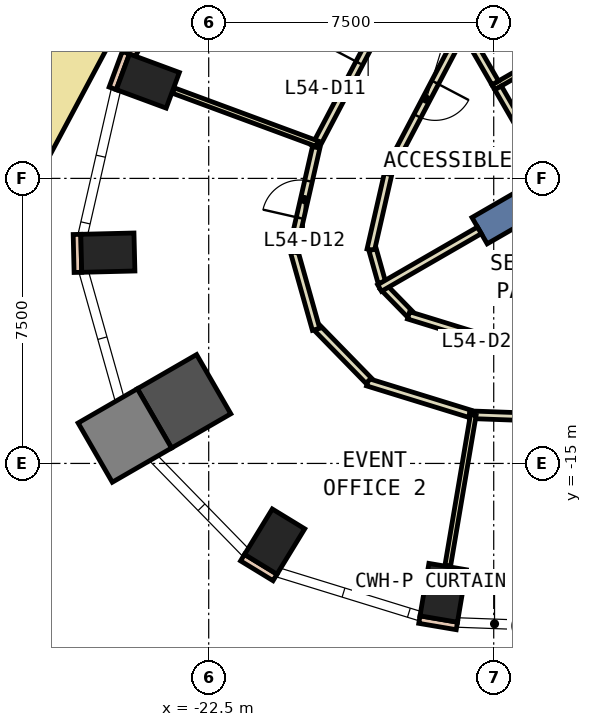
"""IFC4 building model, lengths in metres.
Left out: names, types, materials, properties, quantities, classifications, styles, units other than length and angle.
Written with IfcOpenShell. Run it as: python <this file> out.ifc"""

import sys

from ifc_helpers import new_model, si_unit, direction, frame, frame_2d, origin, origin_2d, place, context, subcontext, project, spatial, rectangle, extrude, element, fill, save


model = new_model("IFC4")
c1 = context("Model", 3, precision=1e-05, world=origin(), true_north=direction((0.0, 1.0)))
c2 = subcontext(c1, "Body", "Model", "MODEL_VIEW")
j1 = project(units=[si_unit("LENGTHUNIT", "METRE"), si_unit("PLANEANGLEUNIT", "RADIAN")], contexts=[c1])
p1 = place(None, origin())
s1 = spatial("IfcSite", under=j1, at=p1, CompositionType="ELEMENT")
p2 = place(p1, origin())
s2 = spatial("IfcBuilding", under=s1, at=p2, CompositionType="ELEMENT")
p3 = place(p2, frame((0.0, 0.0, 241.4)))
s3 = spatial("IfcBuildingStorey", under=s2, at=p3, CompositionType="ELEMENT", Elevation=241.4)
for number, where, z_axis, x_axis in (
    (1, (-16.33, -18.404, 0.0), (0.0, 0.0, 1.0), (-0.986, 0.167, 0.0)),
    (2, (-24.102, -4.939, 0.0), (0.0, 0.0, 1.0), (0.347, 0.938, 0.0)),
    (3, (-25.154, -9.454, 0.0), (0.0, 0.0, 1.0), (-0.025, 1.0, 0.0)),
):
    element("IfcColumn", number, at=place(p3, frame(where, z_axis=z_axis, x_axis=x_axis)), inside=s3, PredefinedType="COLUMN", context=c2, shape_type="SweptSolid", body=[
        extrude(rectangle(XDim=1.0, YDim=1.4, at=origin_2d()), origin(), (0.0, 0.0, 1.0), 3.26),
    ])
p4 = place(p3, frame((-23.148, -13.365, 0.0), z_axis=(0.0, 0.0, 1.0), x_axis=(0.866025403784, 0.5, 0.0)))
e4 = element("IfcColumn", 4, at=p4, inside=s3, PredefinedType="COLUMN", context=c2, shape_type="SweptSolid", body=[
    extrude(rectangle(XDim=1.8, YDim=1.8, at=origin_2d()), origin(), (0.0, 0.0, 1.0), 3.26),
])
p5 = place(p3, frame((-20.765, -17.057, 0.0), z_axis=(0.0, 0.0, 1.0), x_axis=(-0.853341581839, 0.521352227103, 0.0)))
e5 = element("IfcColumn", 5, at=p5, inside=s3, PredefinedType="COLUMN", context=c2, shape_type="SweptSolid", body=[
    extrude(rectangle(XDim=1.0, YDim=1.4, at=origin_2d()), origin(), (0.0, 0.0, 1.0), 3.26),
])
p6 = place(p3, frame((-24.707, -14.265, 0.0), z_axis=(0.0, 0.0, 1.0), x_axis=(0.866025403784, 0.5, 0.0)))
e6 = element("IfcColumn", 6, at=p6, inside=s3, PredefinedType="COLUMN", context=c2, shape_type="SweptSolid", body=[
    extrude(rectangle(XDim=1.8, YDim=1.8, at=origin_2d()), origin(), (0.0, 0.0, 1.0), 3.26),
])
p7 = place(p3, frame((-7.578, -4.375, -0.6), z_axis=(0.0, 0.0, 1.0), x_axis=(-0.866024315419, -0.5000018851, 0.0)))
e7 = element("IfcWall", 7, at=p7, inside=s3, PredefinedType="SHEAR", context=c2, shape_type="SweptSolid", body=[
    extrude(rectangle(XDim=9.0, YDim=0.8, at=frame_2d((4.5, 0.0))), origin(), (0.0, 0.0, 1.0), 3.86),
])
p8 = place(p3, frame((-24.679, -4.193, 0.0), z_axis=(0.0, 0.0, 1.0), x_axis=(-0.346892928577, -0.937904737222, 0.0)))
e8 = element("IfcWall", 8, at=p8, inside=s3, PredefinedType="STANDARD", context=c2, shape_type="SweptSolid", body=[
    extrude(rectangle(XDim=1.0, YDim=0.2, at=frame_2d((0.5, 0.0))), origin(), (0.0, 0.0, 1.0), 3.26),
])
p9 = place(p3, frame((-16.956, -19.109, 0.0), z_axis=(0.0, 0.0, 1.0), x_axis=(0.985961725342, -0.166971483074, 0.0)))
e9 = element("IfcWall", 9, at=p9, inside=s3, PredefinedType="STANDARD", context=c2, shape_type="SweptSolid", body=[
    extrude(rectangle(XDim=1.0, YDim=0.2, at=frame_2d((0.5, 0.0))), origin(), (0.0, 0.0, 1.0), 3.26),
])
p10 = place(p3, frame((-25.966, -8.974, 0.0), z_axis=(0.0, 0.0, 1.0), x_axis=(0.024192379573, -0.999707321555, 0.0)))
e10 = element("IfcWall", 10, at=p10, inside=s3, PredefinedType="STANDARD", context=c2, shape_type="SweptSolid", body=[
    extrude(rectangle(XDim=0.999, YDim=0.2, at=frame_2d((0.5, 0.0))), origin(), (0.0, 0.0, 1.0), 3.26),
])
p11 = place(p3, frame((-21.609, -17.479, 0.0), z_axis=(0.0, 0.0, 1.0), x_axis=(0.853679739553, -0.520798331677, 0.0)))
e11 = element("IfcWall", 11, at=p11, inside=s3, PredefinedType="STANDARD", context=c2, shape_type="SweptSolid", body=[
    extrude(rectangle(XDim=1.0, YDim=0.2, at=frame_2d((0.5, 0.0))), origin(), (0.0, 0.0, 1.0), 3.26),
])
p12 = place(p3, frame((-21.978, 0.698, 0.0), z_axis=(0.0, 0.0, 1.0), x_axis=(-0.465228032148, -0.885190871001, 0.0)))
e12 = element("IfcWall", 12, at=p12, inside=s3, PredefinedType="STANDARD", context=c2, shape_type="SweptSolid", body=[
    extrude(rectangle(XDim=5.572, YDim=0.3, at=frame_2d((2.786, 0.0))), origin(), (0.0, 0.0, 1.0), 3.26),
])
p13 = place(p12, frame((0.693, 0.0, 0.9)))
e13 = element("IfcOpeningElement", 13, at=p13, cuts=e12, PredefinedType="OPENING", context=c2, shape_type="SweptSolid", body=[
    extrude(rectangle(XDim=1.4, YDim=2.0, at=frame_2d((0.7, 1.0))), frame((0.0, 0.16, 0.0), z_axis=(0.0, -1.0, 0.0), x_axis=(1.0, 0.0, 0.0)), (0.0, 0.0, 1.0), 0.32),
])
p14 = place(p12, frame((3.479, 0.0, 0.9)))
e14 = element("IfcOpeningElement", 14, at=p14, cuts=e12, PredefinedType="OPENING", context=c2, shape_type="SweptSolid", body=[
    extrude(rectangle(XDim=1.4, YDim=2.0, at=frame_2d((0.7, 1.0))), frame((0.0, 0.16, 0.0), z_axis=(0.0, -1.0, 0.0), x_axis=(1.0, 0.0, 0.0)), (0.0, 0.0, 1.0), 0.32),
])
p15 = place(p3, frame((-24.806, -1.36, 0.0), z_axis=(0.0, 0.0, 1.0), x_axis=(-0.470628729942, -0.882331342837, 0.0)))
e15 = element("IfcWall", 15, at=p15, inside=s3, PredefinedType="STANDARD", context=c2, shape_type="SweptSolid", body=[
    extrude(rectangle(XDim=5.946, YDim=1.9, at=frame_2d((2.973, 0.0))), origin(), (0.0, 0.0, 1.0), 0.8),
])
p16 = place(p3, frame((-15.746, -3.458, 0.0), z_axis=(0.0, 0.0, 1.0), x_axis=(-0.465179971699, -0.885216128372, 0.0)))
e16 = element("IfcWall", 16, at=p16, inside=s3, PredefinedType="PARTITIONING", context=c2, shape_type="SweptSolid", body=[
    extrude(rectangle(XDim=4.424, YDim=0.2, at=frame_2d((2.212, 0.0))), origin(), (0.0, 0.0, 1.0), 3.26),
])
p17 = place(p16, frame((1.712, 0.0, 0.0)))
e17 = element("IfcOpeningElement", 17, at=p17, cuts=e16, PredefinedType="OPENING", context=c2, shape_type="SweptSolid", body=[
    extrude(rectangle(XDim=1.0, YDim=2.1, at=frame_2d((0.5, 1.05))), frame((0.0, 0.11, 0.0), z_axis=(0.0, -1.0, 0.0), x_axis=(1.0, 0.0, 0.0)), (0.0, 0.0, 1.0), 0.22),
])
p18 = place(p3, frame((-17.78, -7.383, 0.0), z_axis=(0.0, 0.0, 1.0), x_axis=(-0.222760041204, -0.974873306662, 0.0)))
e18 = element("IfcWall", 18, at=p18, inside=s3, PredefinedType="PARTITIONING", context=c2, shape_type="SweptSolid", body=[
    extrude(rectangle(XDim=2.047, YDim=0.2, at=frame_2d((1.024, 0.0))), origin(), (0.0, 0.0, 1.0), 3.26),
])
p19 = place(p3, frame((-18.187, -9.378, 0.0), z_axis=(0.0, 0.0, 1.0), x_axis=(0.270785141481, -0.962639811743, 0.0)))
e19 = element("IfcWall", 19, at=p19, inside=s3, PredefinedType="PARTITIONING", context=c2, shape_type="SweptSolid", body=[
    extrude(rectangle(XDim=0.894, YDim=0.2, at=frame_2d((0.447, 0.0))), origin(), (0.0, 0.0, 1.0), 3.26),
])
p20 = place(p3, frame((-17.915, -10.344, 0.0), z_axis=(0.0, 0.0, 1.0), x_axis=(0.698527813511, -0.715582904877, 0.0)))
e20 = element("IfcWall", 20, at=p20, inside=s3, PredefinedType="PARTITIONING", context=c2, shape_type="SweptSolid", body=[
    extrude(rectangle(XDim=1.002, YDim=0.2, at=frame_2d((0.501, 0.0))), origin(), (0.0, 0.0, 1.0), 3.26),
])
p21 = place(p3, frame((-17.241, -11.103, 0.0), z_axis=(0.0, 0.0, 1.0), x_axis=(0.95563113363, -0.294566013716, 0.0)))
e21 = element("IfcWall", 21, at=p21, inside=s3, PredefinedType="PARTITIONING", context=c2, shape_type="SweptSolid", body=[
    extrude(rectangle(XDim=2.036, YDim=0.2, at=frame_2d((1.018, 0.0))), origin(), (0.0, 0.0, 1.0), 3.26),
])
p22 = place(p3, frame((-15.3, -11.729, 0.0), z_axis=(0.0, 0.0, 1.0), x_axis=(0.999326350165, -0.036699398722, 0.0)))
e22 = element("IfcWall", 22, at=p22, inside=s3, PredefinedType="PARTITIONING", context=c2, shape_type="SweptSolid", body=[
    extrude(rectangle(XDim=4.251, YDim=0.2, at=frame_2d((2.125, 0.0))), origin(), (0.0, 0.0, 1.0), 3.26),
])
p23 = place(p22, frame((1.7, 0.0, 0.0)))
e23 = element("IfcOpeningElement", 23, at=p23, cuts=e22, PredefinedType="OPENING", context=c2, shape_type="SweptSolid", body=[
    extrude(rectangle(XDim=1.0, YDim=2.1, at=frame_2d((0.5, 1.05))), frame((0.0, 0.11, 0.0), z_axis=(0.0, -1.0, 0.0), x_axis=(1.0, 0.0, 0.0)), (0.0, 0.0, 1.0), 0.22),
])
p24 = place(p3, frame((-19.696, -6.675, 0.0), z_axis=(0.0, 0.0, 1.0), x_axis=(0.465165163774, 0.88522390976, 0.0)))
e24 = element("IfcWall", 24, at=p24, inside=s3, PredefinedType="PARTITIONING", context=c2, shape_type="SweptSolid", body=[
    extrude(rectangle(XDim=5.835, YDim=0.2, at=frame_2d((2.917, 0.0))), origin(), (0.0, 0.0, 1.0), 3.26),
])
p25 = place(p24, frame((2.492, 0.0, 0.0)))
e25 = element("IfcOpeningElement", 25, at=p25, cuts=e24, PredefinedType="OPENING", context=c2, shape_type="SweptSolid", body=[
    extrude(rectangle(XDim=1.0, YDim=2.1, at=frame_2d((0.5, 1.05))), frame((0.0, 0.11, 0.0), z_axis=(0.0, -1.0, 0.0), x_axis=(1.0, 0.0, 0.0)), (0.0, 0.0, 1.0), 0.22),
])
p26 = place(p3, frame((-15.632, -13.692, 0.0), z_axis=(0.0, 0.0, 1.0), x_axis=(-0.955600342663, 0.294665887239, 0.0)))
e26 = element("IfcWall", 26, at=p26, inside=s3, PredefinedType="PARTITIONING", context=c2, shape_type="SweptSolid", body=[
    extrude(rectangle(XDim=2.81, YDim=0.2, at=frame_2d((1.405, 0.0))), origin(), (0.0, 0.0, 1.0), 3.26),
])
p27 = place(p3, frame((-18.291, -12.822, 0.0), z_axis=(0.0, 0.0, 1.0), x_axis=(-0.698477855606, 0.715631668687, 0.0)))
e27 = element("IfcWall", 27, at=p27, inside=s3, PredefinedType="PARTITIONING", context=c2, shape_type="SweptSolid", body=[
    extrude(rectangle(XDim=1.921, YDim=0.2, at=frame_2d((0.961, 0.0))), origin(), (0.0, 0.0, 1.0), 3.26),
])
p28 = place(p3, frame((-19.675, -11.472, 0.0), z_axis=(0.0, 0.0, 1.0), x_axis=(-0.270905475888, 0.962605954238, 0.0)))
e28 = element("IfcWall", 28, at=p28, inside=s3, PredefinedType="PARTITIONING", context=c2, shape_type="SweptSolid", body=[
    extrude(rectangle(XDim=2.122, YDim=0.2, at=frame_2d((1.061, 0.0))), origin(), (0.0, 0.0, 1.0), 3.26),
])
p29 = place(p3, frame((-20.299, -9.43, 0.0), z_axis=(0.0, 0.0, 1.0), x_axis=(0.222523624687, 0.974927298036, 0.0)))
e29 = element("IfcWall", 29, at=p29, inside=s3, PredefinedType="PARTITIONING", context=c2, shape_type="SweptSolid", body=[
    extrude(rectangle(XDim=2.817, YDim=0.2, at=frame_2d((1.409, 0.0))), origin(), (0.0, 0.0, 1.0), 3.26),
])
p30 = place(p29, frame((0.909, 0.0, 0.0)))
e30 = element("IfcOpeningElement", 30, at=p30, cuts=e29, PredefinedType="OPENING", context=c2, shape_type="SweptSolid", body=[
    extrude(rectangle(XDim=1.0, YDim=2.1, at=frame_2d((0.5, 1.05))), frame((0.0, 0.11, 0.0), z_axis=(0.0, -1.0, 0.0), x_axis=(1.0, 0.0, 0.0)), (0.0, 0.0, 1.0), 0.22),
])
p31 = place(p3, frame((-7.7, -14.008, 0.0), z_axis=(0.0, 0.0, 1.0), x_axis=(-0.99933282306, 0.036522715615, 0.0)))
e31 = element("IfcWall", 31, at=p31, inside=s3, PredefinedType="PARTITIONING", context=c2, shape_type="SweptSolid", body=[
    extrude(rectangle(XDim=7.941, YDim=0.2, at=frame_2d((3.971, 0.0))), origin(), (0.0, 0.0, 1.0), 3.26),
])
p32 = place(p31, frame((3.471, 0.0, 0.0)))
e32 = element("IfcOpeningElement", 32, at=p32, cuts=e31, PredefinedType="OPENING", context=c2, shape_type="SweptSolid", body=[
    extrude(rectangle(XDim=1.0, YDim=2.1, at=frame_2d((0.5, 1.05))), frame((0.0, 0.11, 0.0), z_axis=(0.0, -1.0, 0.0), x_axis=(1.0, 0.0, 0.0)), (0.0, 0.0, 1.0), 0.22),
])
p33 = place(p3, frame((-10.506, -2.503, 0.0), z_axis=(0.0, 0.0, 1.0), x_axis=(-0.866044872465, -0.49996627774, 0.0)))
e33 = element("IfcWall", 33, at=p33, inside=s3, PredefinedType="PARTITIONING", context=c2, shape_type="SweptSolid", body=[
    extrude(rectangle(XDim=5.2, YDim=0.15, at=frame_2d((2.6, 0.0))), origin(), (0.0, 0.0, 1.0), 3.26),
])
p34 = place(p3, frame((-14.96, -4.988, 0.0), z_axis=(0.0, 0.0, 1.0), x_axis=(-0.500175017317, 0.865924333907, 0.0)))
e34 = element("IfcWall", 34, at=p34, inside=s3, PredefinedType="PARTITIONING", context=c2, shape_type="SweptSolid", body=[
    extrude(rectangle(XDim=1.666, YDim=0.2, at=frame_2d((0.833, 0.0))), origin(), (0.0, 0.0, 1.0), 3.26),
])
p35 = place(p3, frame((-13.58, -7.379, 0.0), z_axis=(0.0, 0.0, 1.0), x_axis=(-0.499870876044, 0.866099940701, 0.0)))
e35 = element("IfcWall", 35, at=p35, inside=s3, PredefinedType="PARTITIONING", context=c2, shape_type="SweptSolid", body=[
    extrude(rectangle(XDim=2.611, YDim=0.2, at=frame_2d((1.305, 0.0))), origin(), (0.0, 0.0, 1.0), 3.26),
])
p36 = place(p3, frame((-15.377, -8.867, 0.0), z_axis=(0.0, 0.0, 1.0), x_axis=(-0.865965767548, -0.500103278768, 0.0)))
e36 = element("IfcWall", 36, at=p36, inside=s3, PredefinedType="PARTITIONING", context=c2, shape_type="SweptSolid", body=[
    extrude(rectangle(XDim=3.033, YDim=0.2, at=frame_2d((1.517, 0.0))), origin(), (0.0, 0.0, 1.0), 3.26),
])
p37 = place(p3, frame((-19.649, -6.586, 0.0), z_axis=(0.0, 0.0, 1.0), x_axis=(-0.937935790958, 0.346808956114, 0.0)))
e37 = element("IfcWall", 37, at=p37, inside=s3, PredefinedType="PARTITIONING", context=c2, shape_type="SweptSolid", body=[
    extrude(rectangle(XDim=4.028, YDim=0.15, at=frame_2d((2.014, 0.0))), origin(), (0.0, 0.0, 1.0), 3.26),
])
p38 = place(p3, frame((-15.537, -13.722, 0.0), z_axis=(0.0, 0.0, 1.0), x_axis=(-0.167012380144, -0.985954798598, 0.0)))
e38 = element("IfcWall", 38, at=p38, inside=s3, PredefinedType="PARTITIONING", context=c2, shape_type="SweptSolid", body=[
    extrude(rectangle(XDim=4.029, YDim=0.15, at=frame_2d((2.014, 0.0))), origin(), (0.0, 0.0, 1.0), 3.26),
])
p39 = place(p25, origin())
e39 = element("IfcDoor", 39, at=p39, inside=s3, OperationType="SINGLE_SWING_LEFT", PredefinedType="DOOR", context=c2, shape_type="SweptSolid", body=[
    extrude(rectangle(XDim=1.0, YDim=2.1, at=frame_2d((0.5, 1.05))), frame((0.0, 0.025, 0.0), z_axis=(0.0, -1.0, 0.0), x_axis=(1.0, 0.0, 0.0)), (0.0, 0.0, 1.0), 0.05),
])
fill(e25, e39)
p40 = place(p30, origin())
e40 = element("IfcDoor", 40, at=p40, inside=s3, OperationType="SINGLE_SWING_LEFT", PredefinedType="DOOR", context=c2, shape_type="SweptSolid", body=[
    extrude(rectangle(XDim=1.0, YDim=2.1, at=frame_2d((0.5, 1.05))), frame((0.0, 0.025, 0.0), z_axis=(0.0, -1.0, 0.0), x_axis=(1.0, 0.0, 0.0)), (0.0, 0.0, 1.0), 0.05),
])
fill(e30, e40)
p41 = place(p17, origin())
e41 = element("IfcDoor", 41, at=p41, inside=s3, OperationType="SINGLE_SWING_LEFT", PredefinedType="DOOR", context=c2, shape_type="SweptSolid", body=[
    extrude(rectangle(XDim=1.0, YDim=2.1, at=frame_2d((0.5, 1.05))), frame((0.0, 0.025, 0.0), z_axis=(0.0, -1.0, 0.0), x_axis=(1.0, 0.0, 0.0)), (0.0, 0.0, 1.0), 0.05),
])
fill(e17, e41)
save(model, sys.argv[1])
